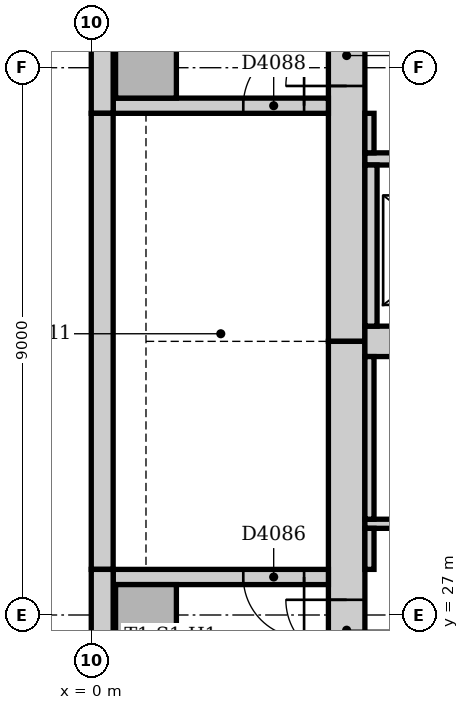
"""IFC4 building model, lengths in metres.
Left out: names, types, materials, properties, quantities, classifications, styles, units other than length and angle.
Written with IfcOpenShell. Run it as: python <this file> out.ifc"""

import sys

from ifc_helpers import new_model, si_unit, direction, frame, frame_2d, origin, origin_2d, place, context, subcontext, project, spatial, rectangle, extrude, element, fill, save


model = new_model("IFC4")
c1 = context("Model", 3, precision=1e-05, world=origin(), true_north=direction((0.0, 1.0)))
c2 = subcontext(c1, "Body", "Model", "MODEL_VIEW")
j1 = project(units=[si_unit("LENGTHUNIT", "METRE"), si_unit("PLANEANGLEUNIT", "RADIAN")], contexts=[c1])
p1 = place(None, origin())
s1 = spatial("IfcSite", under=j1, at=p1, CompositionType="ELEMENT")
p2 = place(p1, origin())
s2 = spatial("IfcBuilding", under=s1, at=p2, CompositionType="ELEMENT")
p3 = place(p2, frame((0.0, 0.0, 116.0)))
s3 = spatial("IfcBuildingStorey", under=s2, at=p3, CompositionType="ELEMENT", Elevation=116.0)
p4 = place(p3, frame((4.2, 42.0, 0.0), z_axis=(0.0, 0.0, 1.0), x_axis=(0.0, -1.0, 0.0)))
e1 = element("IfcWall", 1, at=p4, inside=s3, PredefinedType="SOLIDWALL", context=c2, shape_type="SweptSolid", body=[
    extrude(rectangle(XDim=10.5, YDim=0.6, at=frame_2d((5.25, 0.0))), origin(), (0.0, 0.0, 1.0), 4.0),
])
p5 = place(p4, frame((5.3, 0.0, 0.0)))
e2 = element("IfcOpeningElement", 2, at=p5, cuts=e1, PredefinedType="OPENING", context=c2, shape_type="SweptSolid", body=[
    extrude(rectangle(XDim=1.0, YDim=2.1, at=frame_2d((0.5, 1.05))), frame((0.0, 0.31, 0.0), z_axis=(0.0, -1.0, 0.0), x_axis=(1.0, 0.0, 0.0)), (0.0, 0.0, 1.0), 0.62),
])
p6 = place(p3, frame((4.2, 31.5, 0.0), z_axis=(0.0, 0.0, 1.0), x_axis=(0.0, -1.0, 0.0)))
e3 = element("IfcWall", 3, at=p6, inside=s3, PredefinedType="SOLIDWALL", context=c2, shape_type="SweptSolid", body=[
    extrude(rectangle(XDim=10.5, YDim=0.6, at=frame_2d((5.25, 0.0))), origin(), (0.0, 0.0, 1.0), 4.0),
])
p7 = place(p6, frame((4.25, 0.0, 0.0)))
e4 = element("IfcOpeningElement", 4, at=p7, cuts=e3, PredefinedType="OPENING", context=c2, shape_type="SweptSolid", body=[
    extrude(rectangle(XDim=1.0, YDim=2.1, at=frame_2d((0.5, 1.05))), frame((0.0, 0.31, 0.0), z_axis=(0.0, -1.0, 0.0), x_axis=(1.0, 0.0, 0.0)), (0.0, 0.0, 1.0), 0.62),
])
p8 = place(p3, frame((4.5, 31.5, 0.0), z_axis=(0.0, 0.0, 1.0), x_axis=(1.0, 0.0, 0.0)))
e5 = element("IfcWall", 5, at=p8, inside=s3, PredefinedType="SOLIDWALL", context=c2, shape_type="SweptSolid", body=[
    extrude(rectangle(XDim=18.0, YDim=0.5, at=frame_2d((9.0, 0.0))), origin(), (0.0, 0.0, 1.0), 4.0),
])
p9 = place(p3, frame((3.9, 27.625, 0.0), z_axis=(0.0, 0.0, 1.0), x_axis=(-1.0, 0.0, 0.0)))
e6 = element("IfcWall", 6, at=p9, inside=s3, PredefinedType="SOLIDWALL", context=c2, shape_type="SweptSolid", body=[
    extrude(rectangle(XDim=3.54, YDim=0.25, at=frame_2d((1.77, 0.0))), origin(), (0.0, 0.0, 1.0), 4.0),
])
p10 = place(p9, frame((0.4, 0.0, 0.0)))
e7 = element("IfcOpeningElement", 7, at=p10, cuts=e6, PredefinedType="OPENING", context=c2, shape_type="SweptSolid", body=[
    extrude(rectangle(XDim=1.0, YDim=2.1, at=frame_2d((0.5, 1.05))), frame((0.0, 0.135, 0.0), z_axis=(0.0, -1.0, 0.0), x_axis=(1.0, 0.0, 0.0)), (0.0, 0.0, 1.0), 0.27),
])
p11 = place(p3, frame((0.36, 35.375, 0.0), z_axis=(0.0, 0.0, 1.0), x_axis=(1.0, 0.0, 0.0)))
e8 = element("IfcWall", 8, at=p11, inside=s3, PredefinedType="SOLIDWALL", context=c2, shape_type="SweptSolid", body=[
    extrude(rectangle(XDim=3.54, YDim=0.25, at=frame_2d((1.77, 0.0))), origin(), (0.0, 0.0, 1.0), 4.0),
])
p12 = place(p11, frame((2.14, 0.0, 0.0)))
e9 = element("IfcOpeningElement", 9, at=p12, cuts=e8, PredefinedType="OPENING", context=c2, shape_type="SweptSolid", body=[
    extrude(rectangle(XDim=1.0, YDim=2.1, at=frame_2d((0.5, 1.05))), frame((0.0, 0.135, 0.0), z_axis=(0.0, -1.0, 0.0), x_axis=(1.0, 0.0, 0.0)), (0.0, 0.0, 1.0), 0.27),
])
for number, where, z_axis, x_axis in (
    (10, (0.9, 27.0, 0.0), (0.0, 0.0, 1.0), (1.0, 0.0, 0.0)),
    (11, (0.9, 36.0, 0.0), (0.0, 0.0, 1.0), (1.0, 0.0, 0.0)),
):
    element("IfcColumn", number, at=place(p3, frame(where, z_axis=z_axis, x_axis=x_axis)), inside=s3, PredefinedType="COLUMN", context=c2, shape_type="SweptSolid", body=[
        extrude(rectangle(XDim=1.0, YDim=1.0, at=origin_2d()), origin(), (0.0, 0.0, 1.0), 4.0),
    ])
p13 = place(p3, frame((0.18, 42.0, 0.0), z_axis=(0.0, 0.0, 1.0), x_axis=(0.0, -1.0, 0.0)))
e12 = element("IfcWall", 12, at=p13, inside=s3, PredefinedType="STANDARD", context=c2, shape_type="SweptSolid", body=[
    extrude(rectangle(XDim=6.75, YDim=0.36, at=frame_2d((3.375, 0.0))), origin(), (0.0, 0.0, 1.0), 3.85),
])
p14 = place(p3, frame((0.18, 35.25, 0.0), z_axis=(0.0, 0.0, 1.0), x_axis=(0.0, -1.0, 0.0)))
e13 = element("IfcWall", 13, at=p14, inside=s3, PredefinedType="STANDARD", context=c2, shape_type="SweptSolid", body=[
    extrude(rectangle(XDim=7.5, YDim=0.36, at=frame_2d((3.75, 0.0))), origin(), (0.0, 0.0, 1.0), 3.85),
])
p15 = place(p3, frame((0.18, 27.75, 0.0), z_axis=(0.0, 0.0, 1.0), x_axis=(0.0, -1.0, 0.0)))
e14 = element("IfcWall", 14, at=p15, inside=s3, PredefinedType="STANDARD", context=c2, shape_type="SweptSolid", body=[
    extrude(rectangle(XDim=6.75, YDim=0.36, at=frame_2d((3.375, 0.0))), origin(), (0.0, 0.0, 1.0), 3.85),
])
p16 = place(p3, frame((4.5, 34.5, 0.0), z_axis=(0.0, 0.0, 1.0), x_axis=(1.0, 0.0, 0.0)))
e15 = element("IfcWall", 15, at=p16, inside=s3, PredefinedType="PARTITIONING", context=c2, shape_type="SweptSolid", body=[
    extrude(rectangle(XDim=18.0, YDim=0.2, at=frame_2d((9.0, 0.0))), origin(), (0.0, 0.0, 1.0), 3.85),
])
p17 = place(p16, frame((0.95, 0.0, 0.0)))
e16 = element("IfcOpeningElement", 16, at=p17, cuts=e15, PredefinedType="OPENING", context=c2, shape_type="SweptSolid", body=[
    extrude(rectangle(XDim=1.1, YDim=2.1, at=frame_2d((0.55, 1.05))), frame((0.0, 0.11, 0.0), z_axis=(0.0, -1.0, 0.0), x_axis=(1.0, 0.0, 0.0)), (0.0, 0.0, 1.0), 0.22),
])
p18 = place(p16, frame((3.95, 0.0, 0.0)))
e17 = element("IfcOpeningElement", 17, at=p18, cuts=e15, PredefinedType="OPENING", context=c2, shape_type="SweptSolid", body=[
    extrude(rectangle(XDim=1.1, YDim=2.1, at=frame_2d((0.55, 1.05))), frame((0.0, 0.11, 0.0), z_axis=(0.0, -1.0, 0.0), x_axis=(1.0, 0.0, 0.0)), (0.0, 0.0, 1.0), 0.22),
])
p19 = place(p16, frame((12.95, 0.0, 0.0)))
e18 = element("IfcOpeningElement", 18, at=p19, cuts=e15, PredefinedType="OPENING", context=c2, shape_type="SweptSolid", body=[
    extrude(rectangle(XDim=1.1, YDim=2.1, at=frame_2d((0.55, 1.05))), frame((0.0, 0.11, 0.0), z_axis=(0.0, -1.0, 0.0), x_axis=(1.0, 0.0, 0.0)), (0.0, 0.0, 1.0), 0.22),
])
p20 = place(p16, frame((15.95, 0.0, 0.0)))
e19 = element("IfcOpeningElement", 19, at=p20, cuts=e15, PredefinedType="OPENING", context=c2, shape_type="SweptSolid", body=[
    extrude(rectangle(XDim=1.1, YDim=2.1, at=frame_2d((0.55, 1.05))), frame((0.0, 0.11, 0.0), z_axis=(0.0, -1.0, 0.0), x_axis=(1.0, 0.0, 0.0)), (0.0, 0.0, 1.0), 0.22),
])
p21 = place(p3, frame((4.6, 31.75, 0.0), z_axis=(0.0, 0.0, 1.0), x_axis=(0.0, 1.0, 0.0)))
e20 = element("IfcWall", 20, at=p21, inside=s3, PredefinedType="PARTITIONING", context=c2, shape_type="SweptSolid", body=[
    extrude(rectangle(XDim=2.65, YDim=0.2, at=frame_2d((1.325, 0.0))), origin(), (0.0, 0.0, 1.0), 3.85),
])
p22 = place(p3, frame((4.5, 28.5, 0.0), z_axis=(0.0, 0.0, 1.0), x_axis=(1.0, 0.0, 0.0)))
e21 = element("IfcWall", 21, at=p22, inside=s3, PredefinedType="PARTITIONING", context=c2, shape_type="SweptSolid", body=[
    extrude(rectangle(XDim=18.0, YDim=0.15, at=frame_2d((9.0, 0.0))), origin(), (0.0, 0.0, 1.0), 3.85),
])
p23 = place(p22, frame((1.85, 0.0, 0.0)))
e22 = element("IfcOpeningElement", 22, at=p23, cuts=e21, PredefinedType="OPENING", context=c2, shape_type="SweptSolid", body=[
    extrude(rectangle(XDim=0.9, YDim=2.1, at=frame_2d((0.45, 1.05))), frame((0.0, 0.085, 0.0), z_axis=(0.0, -1.0, 0.0), x_axis=(1.0, 0.0, 0.0)), (0.0, 0.0, 1.0), 0.17),
])
p24 = place(p22, frame((8.55, 0.0, 0.0)))
e23 = element("IfcOpeningElement", 23, at=p24, cuts=e21, PredefinedType="OPENING", context=c2, shape_type="SweptSolid", body=[
    extrude(rectangle(XDim=0.9, YDim=2.1, at=frame_2d((0.45, 1.05))), frame((0.0, 0.085, 0.0), z_axis=(0.0, -1.0, 0.0), x_axis=(1.0, 0.0, 0.0)), (0.0, 0.0, 1.0), 0.17),
])
p25 = place(p22, frame((15.2, 0.0, 0.0)))
e24 = element("IfcOpeningElement", 24, at=p25, cuts=e21, PredefinedType="OPENING", context=c2, shape_type="SweptSolid", body=[
    extrude(rectangle(XDim=0.9, YDim=2.1, at=frame_2d((0.45, 1.05))), frame((0.0, 0.085, 0.0), z_axis=(0.0, -1.0, 0.0), x_axis=(1.0, 0.0, 0.0)), (0.0, 0.0, 1.0), 0.17),
])
p26 = place(p3, frame((4.575, 27.75, 0.0), z_axis=(0.0, 0.0, 1.0), x_axis=(0.0, 1.0, 0.0)))
e25 = element("IfcWall", 25, at=p26, inside=s3, PredefinedType="PARTITIONING", context=c2, shape_type="SweptSolid", body=[
    extrude(rectangle(XDim=0.675, YDim=0.15, at=frame_2d((0.338, 0.0))), origin(), (0.0, 0.0, 1.0), 3.85),
])
p27 = place(p3, frame((4.575, 28.575, 0.0), z_axis=(0.0, 0.0, 1.0), x_axis=(0.0, 1.0, 0.0)))
e26 = element("IfcWall", 26, at=p27, inside=s3, PredefinedType="PARTITIONING", context=c2, shape_type="SweptSolid", body=[
    extrude(rectangle(XDim=2.675, YDim=0.15, at=frame_2d((1.337, 0.0))), origin(), (0.0, 0.0, 1.0), 3.85),
])
p28 = place(p3, frame((4.575, 34.6, 0.0), z_axis=(0.0, 0.0, 1.0), x_axis=(0.0, 1.0, 0.0)))
e27 = element("IfcWall", 27, at=p28, inside=s3, PredefinedType="PARTITIONING", context=c2, shape_type="SweptSolid", body=[
    extrude(rectangle(XDim=0.65, YDim=0.15, at=frame_2d((0.325, 0.0))), origin(), (0.0, 0.0, 1.0), 3.85),
])
p29 = place(p7, frame((1.0, 0.0, 0.0), z_axis=(0.0, 0.0, 1.0), x_axis=(-1.0, 0.0, 0.0)))
e28 = element("IfcDoor", 28, at=p29, inside=s3, OperationType="SINGLE_SWING_RIGHT", PredefinedType="DOOR", context=c2, shape_type="SweptSolid", body=[
    extrude(rectangle(XDim=1.0, YDim=2.1, at=frame_2d((0.5, 1.05))), frame((0.0, 0.025, 0.0), z_axis=(0.0, -1.0, 0.0), x_axis=(1.0, 0.0, 0.0)), (0.0, 0.0, 1.0), 0.05),
])
fill(e4, e28)
p30 = place(p10, origin())
e29 = element("IfcDoor", 29, at=p30, inside=s3, OperationType="SINGLE_SWING_LEFT", PredefinedType="DOOR", context=c2, shape_type="SweptSolid", body=[
    extrude(rectangle(XDim=1.0, YDim=2.1, at=frame_2d((0.5, 1.05))), frame((0.0, 0.025, 0.0), z_axis=(0.0, -1.0, 0.0), x_axis=(1.0, 0.0, 0.0)), (0.0, 0.0, 1.0), 0.05),
])
fill(e7, e29)
p31 = place(p5, frame((1.0, 0.0, 0.0), z_axis=(0.0, 0.0, 1.0), x_axis=(-1.0, 0.0, 0.0)))
e30 = element("IfcDoor", 30, at=p31, inside=s3, OperationType="SINGLE_SWING_LEFT", PredefinedType="DOOR", context=c2, shape_type="SweptSolid", body=[
    extrude(rectangle(XDim=1.0, YDim=2.1, at=frame_2d((0.5, 1.05))), frame((0.0, 0.025, 0.0), z_axis=(0.0, -1.0, 0.0), x_axis=(1.0, 0.0, 0.0)), (0.0, 0.0, 1.0), 0.05),
])
fill(e2, e30)
p32 = place(p12, origin())
e31 = element("IfcDoor", 31, at=p32, inside=s3, OperationType="SINGLE_SWING_RIGHT", PredefinedType="DOOR", context=c2, shape_type="SweptSolid", body=[
    extrude(rectangle(XDim=1.0, YDim=2.1, at=frame_2d((0.5, 1.05))), frame((0.0, 0.025, 0.0), z_axis=(0.0, -1.0, 0.0), x_axis=(1.0, 0.0, 0.0)), (0.0, 0.0, 1.0), 0.05),
])
fill(e9, e31)
save(model, sys.argv[1])
